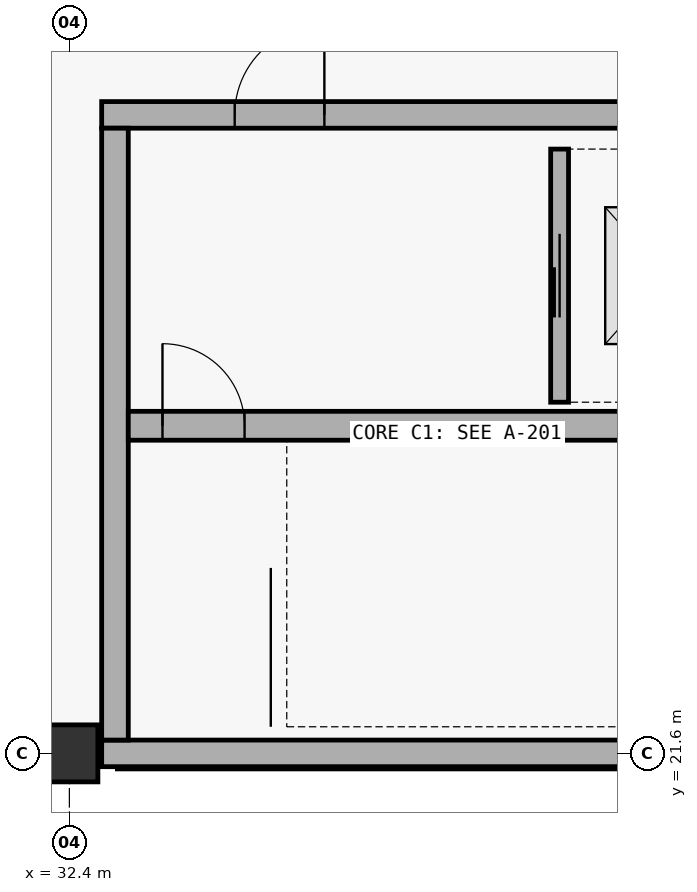
"""IFC4 building model, lengths in metres.
Left out: names, types, materials, properties, quantities, classifications, styles, units other than length and angle.
Written with IfcOpenShell. Run it as: python <this file> out.ifc"""

import sys

from ifc_helpers import new_model, si_unit, direction, frame, frame_2d, origin, origin_2d, place, context, subcontext, project, spatial, rectangle, extrude, element, fill, save


model = new_model("IFC4")
c1 = context("Model", 3, precision=1e-05, world=origin(), true_north=direction((0.0, 1.0)))
c2 = subcontext(c1, "Body", "Model", "MODEL_VIEW")
j1 = project(units=[si_unit("LENGTHUNIT", "METRE"), si_unit("PLANEANGLEUNIT", "RADIAN")], contexts=[c1])
p1 = place(None, origin())
s1 = spatial("IfcSite", under=j1, at=p1, CompositionType="ELEMENT")
p2 = place(p1, origin())
s2 = spatial("IfcBuilding", under=s1, at=p2, CompositionType="ELEMENT")
p3 = place(p2, frame((0.0, 0.0, 20.7)))
s3 = spatial("IfcBuildingStorey", under=s2, at=p3, CompositionType="ELEMENT", Elevation=20.7)
p4 = place(p3, frame((32.4, 21.6, 0.0), z_axis=(0.0, 0.0, 1.0), x_axis=(1.0, 0.0, 0.0)))
e1 = element("IfcColumn", 1, at=p4, inside=s3, PredefinedType="COLUMN", context=c2, shape_type="SweptSolid", body=[
    extrude(rectangle(XDim=0.75, YDim=0.75, at=origin_2d()), origin(), (0.0, 0.0, 1.0), 5.7),
])
p5 = place(p3, frame((32.825, 21.6, 0.0), z_axis=(0.0, 0.0, 1.0), x_axis=(1.0, 0.0, 0.0)))
e2 = element("IfcWall", 2, at=p5, inside=s3, PredefinedType="SHEAR", context=c2, shape_type="SweptSolid", body=[
    extrude(rectangle(XDim=9.35, YDim=0.35, at=frame_2d((4.675, 0.0))), origin(), (0.0, 0.0, 1.0), 5.7),
])
p6 = place(p3, frame((32.825, 30.0, 0.0), z_axis=(0.0, 0.0, 1.0), x_axis=(1.0, 0.0, 0.0)))
e3 = element("IfcWall", 3, at=p6, inside=s3, PredefinedType="SHEAR", context=c2, shape_type="SweptSolid", body=[
    extrude(rectangle(XDim=9.35, YDim=0.35, at=frame_2d((4.675, 0.0))), origin(), (0.0, 0.0, 1.0), 5.7),
])
p7 = place(p6, frame((1.75, 0.0, 0.0)))
e4 = element("IfcOpeningElement", 4, at=p7, cuts=e3, PredefinedType="OPENING", context=c2, shape_type="SweptSolid", body=[
    extrude(rectangle(XDim=1.18, YDim=2.24, at=frame_2d((0.59, 1.12))), frame((0.0, 0.185, 0.0), z_axis=(0.0, -1.0, 0.0), x_axis=(1.0, 0.0, 0.0)), (0.0, 0.0, 1.0), 0.37),
])
p8 = place(p3, frame((33.0, 21.775, 0.0), z_axis=(0.0, 0.0, 1.0), x_axis=(0.0, 1.0, 0.0)))
e5 = element("IfcWall", 5, at=p8, inside=s3, PredefinedType="SHEAR", context=c2, shape_type="SweptSolid", body=[
    extrude(rectangle(XDim=8.05, YDim=0.35, at=frame_2d((4.025, 0.0))), origin(), (0.0, 0.0, 1.0), 5.7),
])
p9 = place(p3, frame((33.175, 25.91, 0.0), z_axis=(0.0, 0.0, 1.0), x_axis=(1.0, 0.0, 0.0)))
e6 = element("IfcWall", 6, at=p9, inside=s3, PredefinedType="SHEAR", context=c2, shape_type="SweptSolid", body=[
    extrude(rectangle(XDim=8.65, YDim=0.38, at=frame_2d((4.325, 0.0))), origin(), (0.0, 0.0, 1.0), 5.7),
])
p10 = place(p9, frame((0.45, 0.0, 0.0)))
e7 = element("IfcOpeningElement", 7, at=p10, cuts=e6, PredefinedType="OPENING", context=c2, shape_type="SweptSolid", body=[
    extrude(rectangle(XDim=1.08, YDim=2.18, at=frame_2d((0.54, 1.09))), frame((0.0, 0.2, 0.0), z_axis=(0.0, -1.0, 0.0), x_axis=(1.0, 0.0, 0.0)), (0.0, 0.0, 1.0), 0.4),
])
p11 = place(p3, frame((38.85, 26.22, 0.0), z_axis=(0.0, 0.0, 1.0), x_axis=(0.0, 1.0, 0.0)))
e8 = element("IfcWall", 8, at=p11, inside=s3, PredefinedType="PARTITIONING", context=c2, shape_type="SweptSolid", body=[
    extrude(rectangle(XDim=3.33, YDim=0.235, at=frame_2d((1.665, 0.0))), origin(), (0.0, 0.0, 1.0), 4.98),
])
p12 = place(p11, frame((1.115, 0.0, 0.0)))
e9 = element("IfcOpeningElement", 9, at=p12, cuts=e8, PredefinedType="OPENING", context=c2, shape_type="SweptSolid", body=[
    extrude(rectangle(XDim=1.1, YDim=2.2, at=frame_2d((0.55, 1.1))), frame((0.0, 0.127, 0.0), z_axis=(0.0, -1.0, 0.0), x_axis=(1.0, 0.0, 0.0)), (0.0, 0.0, 1.0), 0.255),
])
p13 = place(p10, origin())
e10 = element("IfcDoor", 10, at=p13, inside=s3, OperationType="SINGLE_SWING_LEFT", PredefinedType="DOOR", context=c2, shape_type="SweptSolid", body=[
    extrude(rectangle(XDim=1.08, YDim=2.18, at=frame_2d((0.54, 1.09))), frame((0.0, 0.025, 0.0), z_axis=(0.0, -1.0, 0.0), x_axis=(1.0, 0.0, 0.0)), (0.0, 0.0, 1.0), 0.05),
])
fill(e7, e10)
p14 = place(p7, origin())
e11 = element("IfcDoor", 11, at=p14, inside=s3, OperationType="SINGLE_SWING_RIGHT", PredefinedType="DOOR", context=c2, shape_type="SweptSolid", body=[
    extrude(rectangle(XDim=1.18, YDim=2.24, at=frame_2d((0.59, 1.12))), frame((0.0, 0.025, 0.0), z_axis=(0.0, -1.0, 0.0), x_axis=(1.0, 0.0, 0.0)), (0.0, 0.0, 1.0), 0.05),
])
fill(e4, e11)
p15 = place(p12, origin())
e12 = element("IfcDoor", 12, at=p15, inside=s3, OperationType="SLIDING_TO_LEFT", PredefinedType="DOOR", context=c2, shape_type="SweptSolid", body=[
    extrude(rectangle(XDim=1.1, YDim=2.2, at=frame_2d((0.55, 1.1))), frame((0.0, 0.025, 0.0), z_axis=(0.0, -1.0, 0.0), x_axis=(1.0, 0.0, 0.0)), (0.0, 0.0, 1.0), 0.05),
])
fill(e9, e12)
save(model, sys.argv[1])
